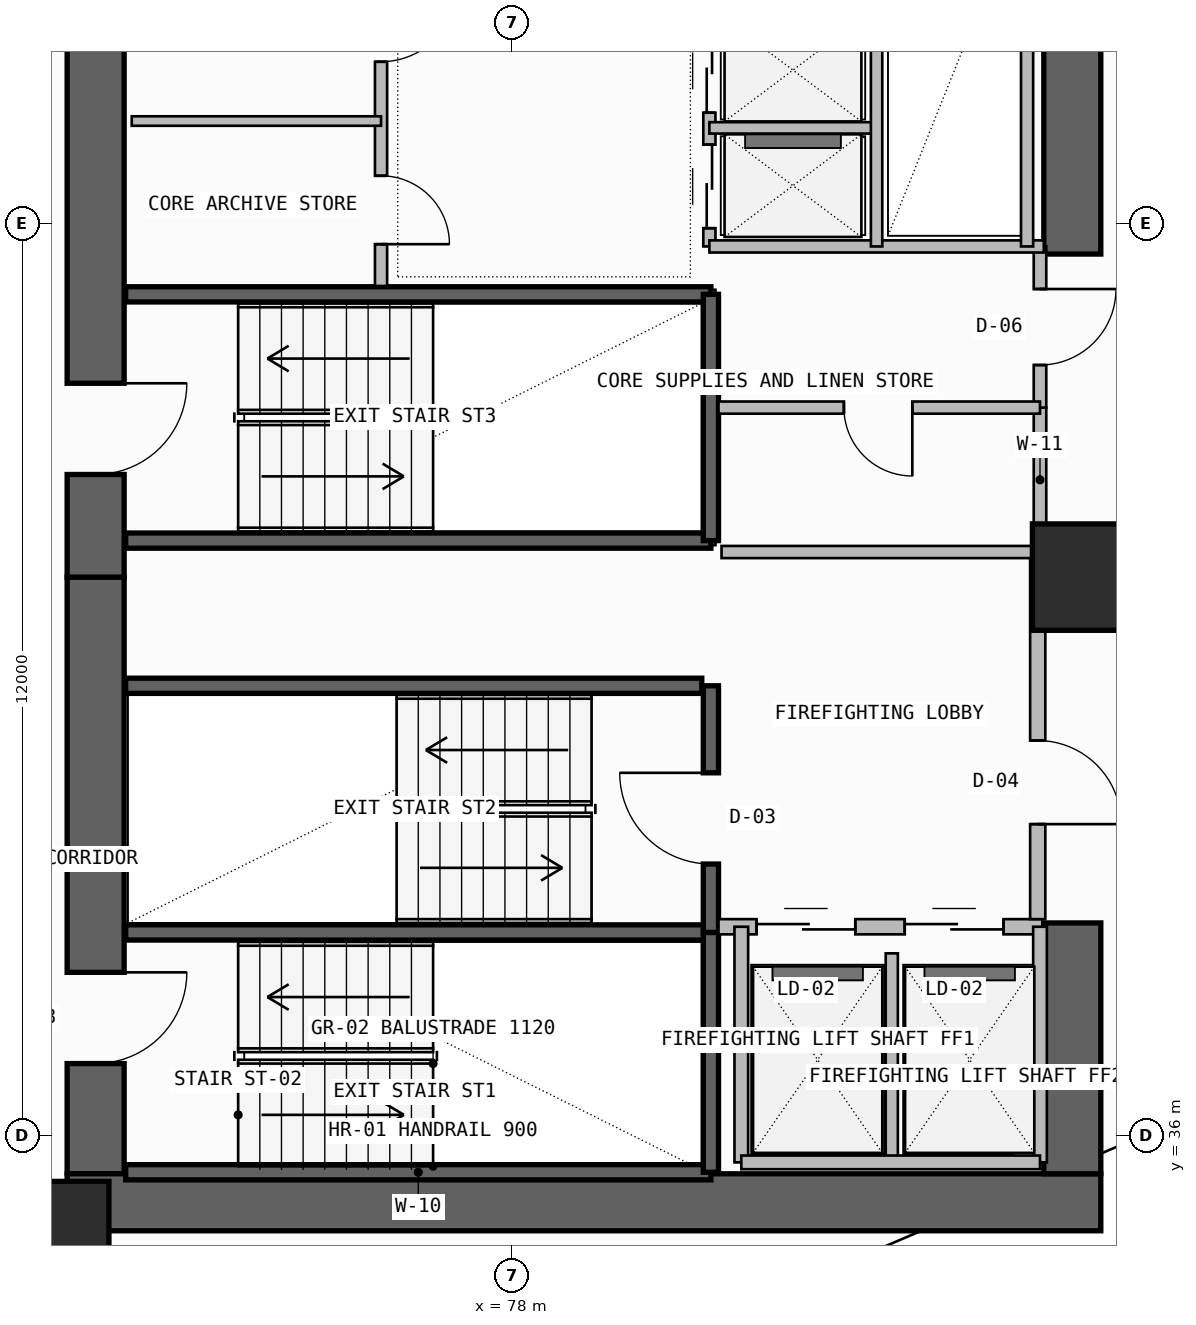
"""IFC4 building model, lengths in metres.
Left out: names, types, materials, properties, quantities, classifications, styles, units other than length and angle.
Written with IfcOpenShell. Run it as: python <this file> out.ifc"""

import sys

from ifc_helpers import new_model, si_unit, direction, frame, frame_2d, origin, origin_2d, place, context, subcontext, project, spatial, rectangle, extrude, element, fill, save


model = new_model("IFC4")
c1 = context("Model", 3, precision=1e-05, world=origin(), true_north=direction((0.0, 1.0)))
c2 = subcontext(c1, "Body", "Model", "MODEL_VIEW")
j1 = project(units=[si_unit("LENGTHUNIT", "METRE"), si_unit("PLANEANGLEUNIT", "RADIAN")], contexts=[c1])
p1 = place(None, origin())
s1 = spatial("IfcSite", under=j1, at=p1, CompositionType="ELEMENT")
p2 = place(p1, origin())
s2 = spatial("IfcBuilding", under=s1, at=p2, CompositionType="ELEMENT")
p3 = place(p2, frame((0.0, 0.0, 179.1)))
s3 = spatial("IfcBuildingStorey", under=s2, at=p3, CompositionType="ELEMENT", Elevation=179.1)
p4 = place(p3, frame((72.525, 35.5, -0.26), z_axis=(0.0, 0.0, 1.0), x_axis=(0.0, 1.0, 0.0)))
e1 = element("IfcWall", 1, at=p4, inside=s3, PredefinedType="SHEAR", context=c2, shape_type="SweptSolid", body=[
    extrude(rectangle(XDim=7.85, YDim=0.75, at=frame_2d((3.925, 0.0))), origin(), (0.0, 0.0, 1.0), 3.52),
])
p5 = place(p4, frame((1.45, 0.0, 0.26)))
e2 = element("IfcOpeningElement", 2, at=p5, cuts=e1, PredefinedType="OPENING", context=c2, shape_type="SweptSolid", body=[
    extrude(rectangle(XDim=1.2, YDim=2.2, at=frame_2d((0.6, 1.1))), frame((0.0, 0.385, 0.0), z_axis=(0.0, -1.0, 0.0), x_axis=(1.0, 0.0, 0.0)), (0.0, 0.0, 1.0), 0.77),
])
p6 = place(p3, frame((72.15, 35.125, -0.26), z_axis=(0.0, 0.0, 1.0), x_axis=(1.0, 0.0, 0.0)))
e3 = element("IfcWall", 3, at=p6, inside=s3, PredefinedType="SHEAR", context=c2, shape_type="SweptSolid", body=[
    extrude(rectangle(XDim=13.6, YDim=0.75, at=frame_2d((6.8, 0.0))), origin(), (0.0, 0.0, 1.0), 3.52),
])
p7 = place(p3, frame((85.375, 35.5, -0.26), z_axis=(0.0, 0.0, 1.0), x_axis=(0.0, 1.0, 0.0)))
e4 = element("IfcWall", 4, at=p7, inside=s3, PredefinedType="SHEAR", context=c2, shape_type="SweptSolid", body=[
    extrude(rectangle(XDim=3.3, YDim=0.75, at=frame_2d((1.65, 0.0))), origin(), (0.0, 0.0, 1.0), 3.52),
])
p8 = place(p3, frame((72.525, 43.35, -0.26), z_axis=(0.0, 0.0, 1.0), x_axis=(0.0, 1.0, 0.0)))
e5 = element("IfcWall", 5, at=p8, inside=s3, PredefinedType="SHEAR", context=c2, shape_type="SweptSolid", body=[
    extrude(rectangle(XDim=12.7, YDim=0.75, at=frame_2d((6.35, 0.0))), origin(), (0.0, 0.0, 1.0), 3.52),
])
p9 = place(p8, frame((1.35, 0.0, 0.26)))
e6 = element("IfcOpeningElement", 6, at=p9, cuts=e5, PredefinedType="OPENING", context=c2, shape_type="SweptSolid", body=[
    extrude(rectangle(XDim=1.2, YDim=2.2, at=frame_2d((0.6, 1.1))), frame((0.0, 0.385, 0.0), z_axis=(0.0, -1.0, 0.0), x_axis=(1.0, 0.0, 0.0)), (0.0, 0.0, 1.0), 0.77),
])
p10 = place(p3, frame((85.375, 47.6, -0.26), z_axis=(0.0, 0.0, 1.0), x_axis=(0.0, 1.0, 0.0)))
e7 = element("IfcWall", 7, at=p10, inside=s3, PredefinedType="SHEAR", context=c2, shape_type="SweptSolid", body=[
    extrude(rectangle(XDim=8.45, YDim=0.75, at=frame_2d((4.225, 0.0))), origin(), (0.0, 0.0, 1.0), 3.52),
])
for number, where, z_axis, x_axis in (
    (8, (72.0, 34.7, 0.0), (0.0, 0.0, 1.0), (1.0, 0.0, 0.0)),
    (9, (85.55, 43.35, 0.0), (0.0, 0.0, 1.0), (1.0, 0.0, 0.0)),
):
    element("IfcColumn", number, at=place(p3, frame(where, z_axis=z_axis, x_axis=x_axis)), inside=s3, PredefinedType="COLUMN", context=c2, shape_type="SweptSolid", body=[
        extrude(rectangle(XDim=1.4, YDim=1.4, at=origin_2d()), origin(), (0.0, 0.0, 1.0), 3.52),
    ])
for number, where, z_axis, x_axis in (
    (10, (72.92, 35.52, -0.26), (0.0, 0.0, 1.0), (1.0, 0.0, 0.0)),
    (11, (72.92, 38.675, -0.26), (0.0, 0.0, 1.0), (1.0, 0.0, 0.0)),
):
    element("IfcWall", number, at=place(p3, frame(where, z_axis=z_axis, x_axis=x_axis)), inside=s3, PredefinedType="SOLIDWALL", context=c2, shape_type="SweptSolid", body=[
        extrude(rectangle(XDim=7.7, YDim=0.2, at=frame_2d((3.85, 0.0))), origin(), (0.0, 0.0, 1.0), 3.52),
    ])
p11 = place(p3, frame((80.62, 35.52, -0.26), z_axis=(0.0, 0.0, 1.0), x_axis=(0.0, 1.0, 0.0)))
e12 = element("IfcWall", 12, at=p11, inside=s3, PredefinedType="SOLIDWALL", context=c2, shape_type="SweptSolid", body=[
    extrude(rectangle(XDim=3.155, YDim=0.2, at=frame_2d((1.578, 0.0))), origin(), (0.0, 0.0, 1.0), 3.52),
])
p12 = place(p3, frame((80.62, 38.675, -0.26), z_axis=(0.0, 0.0, 1.0), x_axis=(0.0, 1.0, 0.0)))
e13 = element("IfcWall", 13, at=p12, inside=s3, PredefinedType="SOLIDWALL", context=c2, shape_type="SweptSolid", body=[
    extrude(rectangle(XDim=3.245, YDim=0.2, at=frame_2d((1.623, 0.0))), origin(), (0.0, 0.0, 1.0), 3.52),
])
p13 = place(p12, frame((0.9, 0.0, 0.26)))
e14 = element("IfcOpeningElement", 14, at=p13, cuts=e13, PredefinedType="OPENING", context=c2, shape_type="SweptSolid", body=[
    extrude(rectangle(XDim=1.2, YDim=2.2, at=frame_2d((0.6, 1.1))), frame((0.0, 0.11, 0.0), z_axis=(0.0, -1.0, 0.0), x_axis=(1.0, 0.0, 0.0)), (0.0, 0.0, 1.0), 0.22),
])
p14 = place(p3, frame((80.72, 38.75, 0.0), z_axis=(0.0, 0.0, 1.0), x_axis=(1.0, 0.0, 0.0)))
e15 = element("IfcWall", 15, at=p14, inside=s3, PredefinedType="SOLIDWALL", context=c2, shape_type="SweptSolid", body=[
    extrude(rectangle(XDim=4.26, YDim=0.2, at=frame_2d((2.13, 0.0))), origin(), (0.0, 0.0, 1.0), 3.26),
])
p15 = place(p14, frame((0.5, 0.0, 0.0)))
e16 = element("IfcOpeningElement", 16, at=p15, cuts=e15, PredefinedType="OPENING", context=c2, shape_type="SweptSolid", body=[
    extrude(rectangle(XDim=1.3, YDim=2.3, at=frame_2d((0.65, 1.15))), frame((0.0, 0.11, 0.0), z_axis=(0.0, -1.0, 0.0), x_axis=(1.0, 0.0, 0.0)), (0.0, 0.0, 1.0), 0.22),
])
p16 = place(p14, frame((2.45, 0.0, 0.0)))
e17 = element("IfcOpeningElement", 17, at=p16, cuts=e15, PredefinedType="OPENING", context=c2, shape_type="SweptSolid", body=[
    extrude(rectangle(XDim=1.3, YDim=2.3, at=frame_2d((0.65, 1.15))), frame((0.0, 0.11, 0.0), z_axis=(0.0, -1.0, 0.0), x_axis=(1.0, 0.0, 0.0)), (0.0, 0.0, 1.0), 0.22),
])
p17 = place(p3, frame((83.0, 35.65, 0.0), z_axis=(0.0, 0.0, 1.0), x_axis=(0.0, 1.0, 0.0)))
e18 = element("IfcWall", 18, at=p17, inside=s3, PredefinedType="PLUMBINGWALL", context=c2, shape_type="SweptSolid", body=[
    extrude(rectangle(XDim=2.75, YDim=0.16, at=frame_2d((1.375, 0.0))), origin(), (0.0, 0.0, 1.0), 3.26),
])
for number, where, z_axis, x_axis in (
    (19, (84.95, 35.65, 0.0), (0.0, 0.0, 1.0), (0.0, 1.0, 0.0)),
    (20, (81.02, 35.65, 0.0), (0.0, 0.0, 1.0), (0.0, 1.0, 0.0)),
):
    element("IfcWall", number, at=place(p3, frame(where, z_axis=z_axis, x_axis=x_axis)), inside=s3, PredefinedType="SOLIDWALL", context=c2, shape_type="SweptSolid", body=[
        extrude(rectangle(XDim=3.1, YDim=0.18, at=frame_2d((1.55, 0.0))), origin(), (0.0, 0.0, 1.0), 3.26),
    ])
p18 = place(p3, frame((81.02, 35.65, 0.0), z_axis=(0.0, 0.0, 1.0), x_axis=(1.0, 0.0, 0.0)))
e21 = element("IfcWall", 21, at=p18, inside=s3, PredefinedType="SOLIDWALL", context=c2, shape_type="SweptSolid", body=[
    extrude(rectangle(XDim=3.93, YDim=0.18, at=frame_2d((1.965, 0.0))), origin(), (0.0, 0.0, 1.0), 3.26),
])
p19 = place(p3, frame((84.92, 38.85, 0.0), z_axis=(0.0, 0.0, 1.0), x_axis=(0.0, 1.0, 0.0)))
e22 = element("IfcWall", 22, at=p19, inside=s3, PredefinedType="SOLIDWALL", context=c2, shape_type="SweptSolid", body=[
    extrude(rectangle(XDim=4.83, YDim=0.2, at=frame_2d((2.415, 0.0))), origin(), (0.0, 0.0, 1.0), 3.26),
])
p20 = place(p19, frame((1.25, 0.0, 0.0)))
e23 = element("IfcOpeningElement", 23, at=p20, cuts=e22, PredefinedType="OPENING", context=c2, shape_type="SweptSolid", body=[
    extrude(rectangle(XDim=1.1, YDim=2.2, at=frame_2d((0.55, 1.1))), frame((0.0, 0.11, 0.0), z_axis=(0.0, -1.0, 0.0), x_axis=(1.0, 0.0, 0.0)), (0.0, 0.0, 1.0), 0.22),
])
p21 = place(p3, frame((72.92, 41.92, -0.26), z_axis=(0.0, 0.0, 1.0), x_axis=(1.0, 0.0, 0.0)))
e24 = element("IfcWall", 24, at=p21, inside=s3, PredefinedType="SOLIDWALL", context=c2, shape_type="SweptSolid", body=[
    extrude(rectangle(XDim=7.58, YDim=0.2, at=frame_2d((3.79, 0.0))), origin(), (0.0, 0.0, 1.0), 3.52),
])
for number, where, z_axis, x_axis in (
    (25, (72.92, 43.83, -0.26), (0.0, 0.0, 1.0), (1.0, 0.0, 0.0)),
    (26, (72.92, 47.07, -0.26), (0.0, 0.0, 1.0), (1.0, 0.0, 0.0)),
):
    element("IfcWall", number, at=place(p3, frame(where, z_axis=z_axis, x_axis=x_axis)), inside=s3, PredefinedType="SOLIDWALL", context=c2, shape_type="SweptSolid", body=[
        extrude(rectangle(XDim=7.7, YDim=0.2, at=frame_2d((3.85, 0.0))), origin(), (0.0, 0.0, 1.0), 3.52),
    ])
p22 = place(p3, frame((80.62, 43.83, -0.26), z_axis=(0.0, 0.0, 1.0), x_axis=(0.0, 1.0, 0.0)))
e27 = element("IfcWall", 27, at=p22, inside=s3, PredefinedType="SOLIDWALL", context=c2, shape_type="SweptSolid", body=[
    extrude(rectangle(XDim=3.24, YDim=0.2, at=frame_2d((1.62, 0.0))), origin(), (0.0, 0.0, 1.0), 3.52),
])
p23 = place(p3, frame((84.95, 43.68, 0.0), z_axis=(0.0, 0.0, 1.0), x_axis=(0.0, 1.0, 0.0)))
e28 = element("IfcWall", 28, at=p23, inside=s3, PredefinedType="PLUMBINGWALL", context=c2, shape_type="SweptSolid", body=[
    extrude(rectangle(XDim=1.9, YDim=0.165, at=frame_2d((0.95, 0.0))), origin(), (0.0, 0.0, 1.0), 3.26),
])
p24 = place(p3, frame((84.95, 45.58, 0.0), z_axis=(0.0, 0.0, 1.0), x_axis=(0.0, 1.0, 0.0)))
e29 = element("IfcWall", 29, at=p24, inside=s3, PredefinedType="PARTITIONING", context=c2, shape_type="SweptSolid", body=[
    extrude(rectangle(XDim=2.12, YDim=0.165, at=frame_2d((1.06, 0.0))), origin(), (0.0, 0.0, 1.0), 3.26),
])
p25 = place(p24, frame((0.56, 0.0, 0.0)))
e30 = element("IfcOpeningElement", 30, at=p25, cuts=e29, PredefinedType="OPENING", context=c2, shape_type="SweptSolid", body=[
    extrude(rectangle(XDim=1.0, YDim=2.2, at=frame_2d((0.5, 1.1))), frame((0.0, 0.093, 0.0), z_axis=(0.0, -1.0, 0.0), x_axis=(1.0, 0.0, 0.0)), (0.0, 0.0, 1.0), 0.185),
])
p26 = place(p3, frame((80.72, 45.58, 0.0), z_axis=(0.0, 0.0, 1.0), x_axis=(1.0, 0.0, 0.0)))
e31 = element("IfcWall", 31, at=p26, inside=s3, PredefinedType="PLUMBINGWALL", context=c2, shape_type="SweptSolid", body=[
    extrude(rectangle(XDim=4.23, YDim=0.16, at=frame_2d((2.115, 0.0))), origin(), (0.0, 0.0, 1.0), 3.26),
])
p27 = place(p26, frame((1.65, 0.0, 0.0)))
e32 = element("IfcOpeningElement", 32, at=p27, cuts=e31, PredefinedType="OPENING", context=c2, shape_type="SweptSolid", body=[
    extrude(rectangle(XDim=0.9, YDim=2.1, at=frame_2d((0.45, 1.05))), frame((0.0, 0.09, 0.0), z_axis=(0.0, -1.0, 0.0), x_axis=(1.0, 0.0, 0.0)), (0.0, 0.0, 1.0), 0.18),
])
p28 = place(p3, frame((80.76, 43.68, 0.0), z_axis=(0.0, 0.0, 1.0), x_axis=(1.0, 0.0, 0.0)))
e33 = element("IfcWall", 33, at=p28, inside=s3, PredefinedType="PLUMBINGWALL", context=c2, shape_type="SweptSolid", body=[
    extrude(rectangle(XDim=4.19, YDim=0.16, at=frame_2d((2.095, 0.0))), origin(), (0.0, 0.0, 1.0), 3.26),
])
p29 = place(p3, frame((76.28, 47.18, 0.0), z_axis=(0.0, 0.0, 1.0), x_axis=(0.0, 1.0, 0.0)))
e34 = element("IfcWall", 34, at=p29, inside=s3, PredefinedType="SOLIDWALL", context=c2, shape_type="SweptSolid", body=[
    extrude(rectangle(XDim=5.14, YDim=0.16, at=frame_2d((2.57, 0.0))), origin(), (0.0, 0.0, 1.0), 3.26),
])
p30 = place(p29, frame((0.55, 0.0, 0.0)))
e35 = element("IfcOpeningElement", 35, at=p30, cuts=e34, PredefinedType="OPENING", context=c2, shape_type="SweptSolid", body=[
    extrude(rectangle(XDim=0.9, YDim=2.1, at=frame_2d((0.45, 1.05))), frame((0.0, 0.09, 0.0), z_axis=(0.0, -1.0, 0.0), x_axis=(1.0, 0.0, 0.0)), (0.0, 0.0, 1.0), 0.18),
])
p31 = place(p29, frame((2.95, 0.0, 0.0)))
e36 = element("IfcOpeningElement", 36, at=p31, cuts=e34, PredefinedType="OPENING", context=c2, shape_type="SweptSolid", body=[
    extrude(rectangle(XDim=1.0, YDim=2.2, at=frame_2d((0.5, 1.1))), frame((0.0, 0.09, 0.0), z_axis=(0.0, -1.0, 0.0), x_axis=(1.0, 0.0, 0.0)), (0.0, 0.0, 1.0), 0.18),
])
p32 = place(p3, frame((73.0, 49.35, 0.0), z_axis=(0.0, 0.0, 1.0), x_axis=(1.0, 0.0, 0.0)))
e37 = element("IfcWall", 37, at=p32, inside=s3, PredefinedType="PARTITIONING", context=c2, shape_type="SweptSolid", body=[
    extrude(rectangle(XDim=3.28, YDim=0.125, at=frame_2d((1.64, 0.0))), origin(), (0.0, 0.0, 1.0), 3.26),
])
p33 = place(p3, frame((80.6, 47.7, 0.0), z_axis=(0.0, 0.0, 1.0), x_axis=(0.0, 1.0, 0.0)))
e38 = element("IfcWall", 38, at=p33, inside=s3, PredefinedType="SOLIDWALL", context=c2, shape_type="SweptSolid", body=[
    extrude(rectangle(XDim=4.6, YDim=0.16, at=frame_2d((2.3, 0.0))), origin(), (0.0, 0.0, 1.0), 3.26),
])
p34 = place(p33, frame((0.24, 0.0, 0.0)))
e39 = element("IfcOpeningElement", 39, at=p34, cuts=e38, PredefinedType="OPENING", context=c2, shape_type="SweptSolid", body=[
    extrude(rectangle(XDim=1.1, YDim=2.25, at=frame_2d((0.55, 1.125))), frame((0.0, 0.09, 0.0), z_axis=(0.0, -1.0, 0.0), x_axis=(1.0, 0.0, 0.0)), (0.0, 0.0, 1.0), 0.18),
])
p35 = place(p33, frame((1.76, 0.0, 0.0)))
e40 = element("IfcOpeningElement", 40, at=p35, cuts=e38, PredefinedType="OPENING", context=c2, shape_type="SweptSolid", body=[
    extrude(rectangle(XDim=1.1, YDim=2.25, at=frame_2d((0.55, 1.125))), frame((0.0, 0.09, 0.0), z_axis=(0.0, -1.0, 0.0), x_axis=(1.0, 0.0, 0.0)), (0.0, 0.0, 1.0), 0.18),
])
p36 = place(p33, frame((3.28, 0.0, 0.0)))
e41 = element("IfcOpeningElement", 41, at=p36, cuts=e38, PredefinedType="OPENING", context=c2, shape_type="SweptSolid", body=[
    extrude(rectangle(XDim=1.1, YDim=2.25, at=frame_2d((0.55, 1.125))), frame((0.0, 0.09, 0.0), z_axis=(0.0, -1.0, 0.0), x_axis=(1.0, 0.0, 0.0)), (0.0, 0.0, 1.0), 0.18),
])
p37 = place(p3, frame((80.6, 47.7, 0.0), z_axis=(0.0, 0.0, 1.0), x_axis=(1.0, 0.0, 0.0)))
e42 = element("IfcWall", 42, at=p37, inside=s3, PredefinedType="SOLIDWALL", context=c2, shape_type="SweptSolid", body=[
    extrude(rectangle(XDim=4.4, YDim=0.16, at=frame_2d((2.2, 0.0))), origin(), (0.0, 0.0, 1.0), 3.26),
])
p38 = place(p3, frame((80.6, 49.26, 0.0), z_axis=(0.0, 0.0, 1.0), x_axis=(1.0, 0.0, 0.0)))
e43 = element("IfcWall", 43, at=p38, inside=s3, PredefinedType="PLUMBINGWALL", context=c2, shape_type="SweptSolid", body=[
    extrude(rectangle(XDim=2.2, YDim=0.15, at=frame_2d((1.1, 0.0))), origin(), (0.0, 0.0, 1.0), 3.26),
])
p39 = place(p3, frame((82.8, 47.7, 0.0), z_axis=(0.0, 0.0, 1.0), x_axis=(0.0, 1.0, 0.0)))
e44 = element("IfcWall", 44, at=p39, inside=s3, PredefinedType="PLUMBINGWALL", context=c2, shape_type="SweptSolid", body=[
    extrude(rectangle(XDim=4.6, YDim=0.15, at=frame_2d((2.3, 0.0))), origin(), (0.0, 0.0, 1.0), 3.26),
])
p40 = place(p3, frame((84.78, 47.7, 0.0), z_axis=(0.0, 0.0, 1.0), x_axis=(0.0, 1.0, 0.0)))
e45 = element("IfcWall", 45, at=p40, inside=s3, PredefinedType="SOLIDWALL", context=c2, shape_type="SweptSolid", body=[
    extrude(rectangle(XDim=4.6, YDim=0.16, at=frame_2d((2.3, 0.0))), origin(), (0.0, 0.0, 1.0), 3.26),
])
p41 = place(p5, frame((1.2, 0.0, 0.0), z_axis=(0.0, 0.0, 1.0), x_axis=(-1.0, 0.0, 0.0)))
e46 = element("IfcDoor", 46, at=p41, inside=s3, OperationType="SINGLE_SWING_LEFT", PredefinedType="USERDEFINED", context=c2, shape_type="SweptSolid", body=[
    extrude(rectangle(XDim=1.2, YDim=2.2, at=frame_2d((0.6, 1.1))), frame((0.0, 0.025, 0.0), z_axis=(0.0, -1.0, 0.0), x_axis=(1.0, 0.0, 0.0)), (0.0, 0.0, 1.0), 0.05),
])
fill(e2, e46)
p42 = place(p13, origin())
e47 = element("IfcDoor", 47, at=p42, inside=s3, OperationType="SINGLE_SWING_RIGHT", PredefinedType="USERDEFINED", context=c2, shape_type="SweptSolid", body=[
    extrude(rectangle(XDim=1.2, YDim=2.2, at=frame_2d((0.6, 1.1))), frame((0.0, 0.025, 0.0), z_axis=(0.0, -1.0, 0.0), x_axis=(1.0, 0.0, 0.0)), (0.0, 0.0, 1.0), 0.05),
])
fill(e14, e47)
p43 = place(p15, origin())
e48 = element("IfcDoor", 48, at=p43, inside=s3, OperationType="DOUBLE_DOOR_SLIDING", PredefinedType="DOOR", context=c2, shape_type="SweptSolid", body=[
    extrude(rectangle(XDim=1.3, YDim=2.3, at=frame_2d((0.65, 1.15))), frame((0.0, 0.025, 0.0), z_axis=(0.0, -1.0, 0.0), x_axis=(1.0, 0.0, 0.0)), (0.0, 0.0, 1.0), 0.05),
])
fill(e16, e48)
p44 = place(p16, origin())
e49 = element("IfcDoor", 49, at=p44, inside=s3, OperationType="DOUBLE_DOOR_SLIDING", PredefinedType="DOOR", context=c2, shape_type="SweptSolid", body=[
    extrude(rectangle(XDim=1.3, YDim=2.3, at=frame_2d((0.65, 1.15))), frame((0.0, 0.025, 0.0), z_axis=(0.0, -1.0, 0.0), x_axis=(1.0, 0.0, 0.0)), (0.0, 0.0, 1.0), 0.05),
])
fill(e17, e49)
p45 = place(p20, frame((1.1, 0.0, 0.0), z_axis=(0.0, 0.0, 1.0), x_axis=(-1.0, 0.0, 0.0)))
e50 = element("IfcDoor", 50, at=p45, inside=s3, OperationType="SINGLE_SWING_RIGHT", PredefinedType="DOOR", context=c2, shape_type="SweptSolid", body=[
    extrude(rectangle(XDim=1.1, YDim=2.2, at=frame_2d((0.55, 1.1))), frame((0.0, 0.025, 0.0), z_axis=(0.0, -1.0, 0.0), x_axis=(1.0, 0.0, 0.0)), (0.0, 0.0, 1.0), 0.05),
])
fill(e23, e50)
p46 = place(p9, frame((1.2, 0.0, 0.0), z_axis=(0.0, 0.0, 1.0), x_axis=(-1.0, 0.0, 0.0)))
e51 = element("IfcDoor", 51, at=p46, inside=s3, OperationType="SINGLE_SWING_LEFT", PredefinedType="USERDEFINED", context=c2, shape_type="SweptSolid", body=[
    extrude(rectangle(XDim=1.2, YDim=2.2, at=frame_2d((0.6, 1.1))), frame((0.0, 0.025, 0.0), z_axis=(0.0, -1.0, 0.0), x_axis=(1.0, 0.0, 0.0)), (0.0, 0.0, 1.0), 0.05),
])
fill(e6, e51)
p47 = place(p25, frame((1.0, 0.0, 0.0), z_axis=(0.0, 0.0, 1.0), x_axis=(-1.0, 0.0, 0.0)))
e52 = element("IfcDoor", 52, at=p47, inside=s3, OperationType="SINGLE_SWING_LEFT", PredefinedType="DOOR", context=c2, shape_type="SweptSolid", body=[
    extrude(rectangle(XDim=1.0, YDim=2.2, at=frame_2d((0.5, 1.1))), frame((0.0, 0.025, 0.0), z_axis=(0.0, -1.0, 0.0), x_axis=(1.0, 0.0, 0.0)), (0.0, 0.0, 1.0), 0.05),
])
fill(e30, e52)
p48 = place(p27, frame((0.9, 0.0, 0.0), z_axis=(0.0, 0.0, 1.0), x_axis=(-1.0, 0.0, 0.0)))
e53 = element("IfcDoor", 53, at=p48, inside=s3, OperationType="SINGLE_SWING_LEFT", PredefinedType="DOOR", context=c2, shape_type="SweptSolid", body=[
    extrude(rectangle(XDim=0.9, YDim=2.1, at=frame_2d((0.45, 1.05))), frame((0.0, 0.025, 0.0), z_axis=(0.0, -1.0, 0.0), x_axis=(1.0, 0.0, 0.0)), (0.0, 0.0, 1.0), 0.05),
])
fill(e32, e53)
p49 = place(p30, frame((0.9, 0.0, 0.0), z_axis=(0.0, 0.0, 1.0), x_axis=(-1.0, 0.0, 0.0)))
e54 = element("IfcDoor", 54, at=p49, inside=s3, OperationType="SINGLE_SWING_RIGHT", PredefinedType="DOOR", context=c2, shape_type="SweptSolid", body=[
    extrude(rectangle(XDim=0.9, YDim=2.1, at=frame_2d((0.45, 1.05))), frame((0.0, 0.025, 0.0), z_axis=(0.0, -1.0, 0.0), x_axis=(1.0, 0.0, 0.0)), (0.0, 0.0, 1.0), 0.05),
])
fill(e35, e54)
p50 = place(p31, frame((1.0, 0.0, 0.0), z_axis=(0.0, 0.0, 1.0), x_axis=(-1.0, 0.0, 0.0)))
e55 = element("IfcDoor", 55, at=p50, inside=s3, OperationType="SINGLE_SWING_LEFT", PredefinedType="DOOR", context=c2, shape_type="SweptSolid", body=[
    extrude(rectangle(XDim=1.0, YDim=2.2, at=frame_2d((0.5, 1.1))), frame((0.0, 0.025, 0.0), z_axis=(0.0, -1.0, 0.0), x_axis=(1.0, 0.0, 0.0)), (0.0, 0.0, 1.0), 0.05),
])
fill(e36, e55)
p51 = place(p34, frame((1.1, 0.0, 0.0), z_axis=(0.0, 0.0, 1.0), x_axis=(-1.0, 0.0, 0.0)))
e56 = element("IfcDoor", 56, at=p51, inside=s3, OperationType="DOUBLE_DOOR_SLIDING", PredefinedType="DOOR", context=c2, shape_type="SweptSolid", body=[
    extrude(rectangle(XDim=1.1, YDim=2.25, at=frame_2d((0.55, 1.125))), frame((0.0, 0.025, 0.0), z_axis=(0.0, -1.0, 0.0), x_axis=(1.0, 0.0, 0.0)), (0.0, 0.0, 1.0), 0.05),
])
fill(e39, e56)
p52 = place(p35, frame((1.1, 0.0, 0.0), z_axis=(0.0, 0.0, 1.0), x_axis=(-1.0, 0.0, 0.0)))
e57 = element("IfcDoor", 57, at=p52, inside=s3, OperationType="DOUBLE_DOOR_SLIDING", PredefinedType="DOOR", context=c2, shape_type="SweptSolid", body=[
    extrude(rectangle(XDim=1.1, YDim=2.25, at=frame_2d((0.55, 1.125))), frame((0.0, 0.025, 0.0), z_axis=(0.0, -1.0, 0.0), x_axis=(1.0, 0.0, 0.0)), (0.0, 0.0, 1.0), 0.05),
])
fill(e40, e57)
save(model, sys.argv[1])
